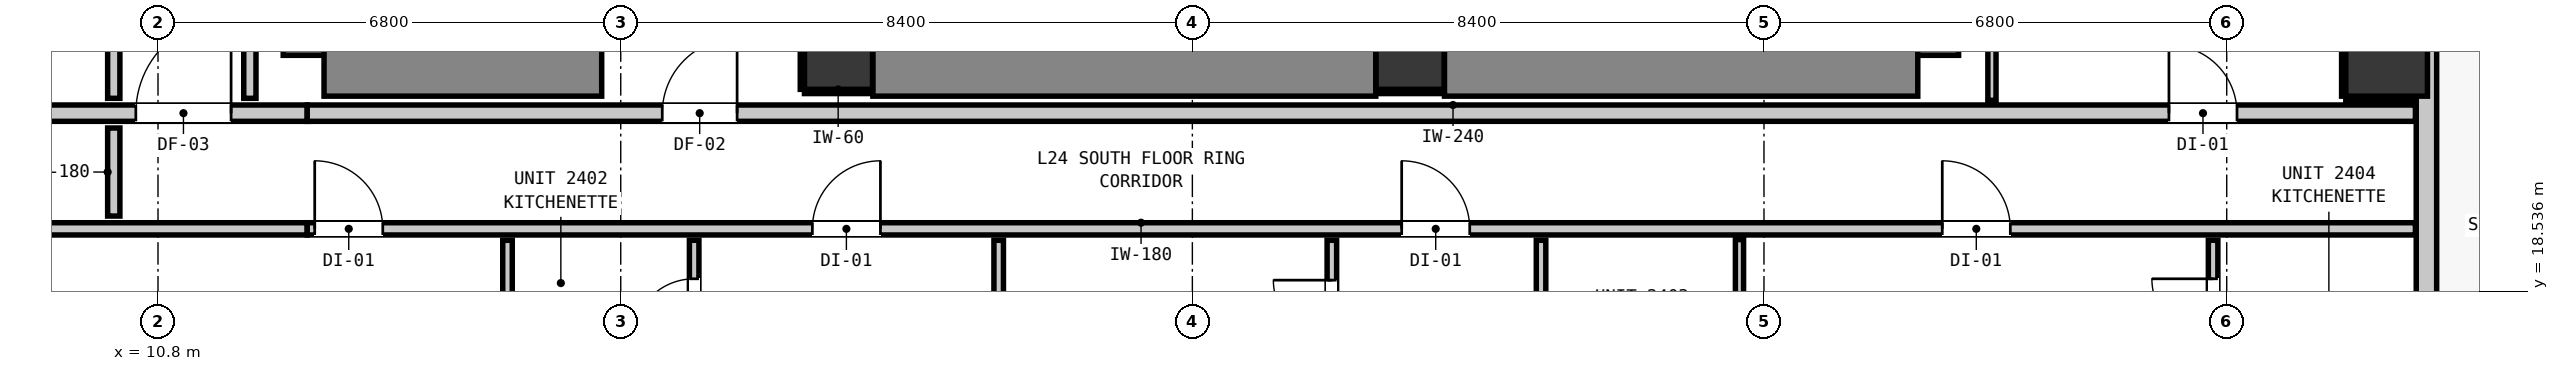
"""IFC4 building model, lengths in metres.
Left out: names, types, materials, properties, quantities, classifications, styles, units other than length and angle.
Written with IfcOpenShell. Run it as: python <this file> out.ifc"""

import sys

from ifc_helpers import new_model, si_unit, direction, frame, frame_2d, origin, origin_2d, place, context, subcontext, project, spatial, rectangle, extrude, element, fill, save


model = new_model("IFC4")
c1 = context("Model", 3, precision=1e-05, world=origin(), true_north=direction((0.0, 1.0)))
c2 = subcontext(c1, "Body", "Model", "MODEL_VIEW")
j1 = project(units=[si_unit("LENGTHUNIT", "METRE"), si_unit("PLANEANGLEUNIT", "RADIAN")], contexts=[c1])
p1 = place(None, origin())
s1 = spatial("IfcSite", under=j1, at=p1, CompositionType="ELEMENT")
p2 = place(p1, origin())
s2 = spatial("IfcBuilding", under=s1, at=p2, CompositionType="ELEMENT")
p3 = place(p2, frame((0.0, 0.0, 85.08)))
s3 = spatial("IfcBuildingStorey", under=s2, at=p3, CompositionType="ELEMENT", Elevation=85.08)
for number, where, z_axis, x_axis in (
    (1, (20.8, 22.0, 0.0), (0.0, 0.0, 1.0), (1.0, 0.0, 0.0)),
    (2, (29.2, 22.0, 0.0), (0.0, 0.0, 1.0), (1.0, 0.0, 0.0)),
):
    element("IfcColumn", number, at=place(p3, frame(where, z_axis=z_axis, x_axis=x_axis)), inside=s3, PredefinedType="COLUMN", context=c2, shape_type="SweptSolid", body=[
        extrude(rectangle(XDim=1.0, YDim=1.0, at=origin_2d()), origin(), (0.0, 0.0, 1.0), 3.32),
    ])
p4 = place(p3, frame((13.24, 22.0, 0.0), z_axis=(0.0, 0.0, 1.0), x_axis=(0.0, 1.0, 0.0)))
e3 = element("IfcWall", 3, at=p4, inside=s3, PredefinedType="SHEAR", context=c2, shape_type="SweptSolid", body=[
    extrude(rectangle(XDim=8.195, YDim=1.2, at=frame_2d((4.098, 0.0))), origin(), (0.0, 0.0, 1.0), 3.32),
])
p5 = place(p3, frame((13.24, 22.0, 0.0), z_axis=(0.0, 0.0, 1.0), x_axis=(1.0, 0.0, 0.0)))
e4 = element("IfcWall", 4, at=p5, inside=s3, PredefinedType="SHEAR", context=c2, shape_type="SweptSolid", body=[
    extrude(rectangle(XDim=4.08, YDim=1.2, at=frame_2d((2.04, 0.0))), origin(), (0.0, 0.0, 1.0), 3.32),
])
p6 = place(p3, frame((36.66, 22.0, 0.0), z_axis=(0.0, 0.0, 1.0), x_axis=(0.0, 1.0, 0.0)))
e5 = element("IfcWall", 5, at=p6, inside=s3, PredefinedType="SHEAR", context=c2, shape_type="SweptSolid", body=[
    extrude(rectangle(XDim=8.195, YDim=1.2, at=frame_2d((4.098, 0.0))), origin(), (0.0, 0.0, 1.0), 3.32),
])
p7 = place(p3, frame((29.705, 22.0, 0.0), z_axis=(0.0, 0.0, 1.0), x_axis=(1.0, 0.0, 0.0)))
e6 = element("IfcWall", 6, at=p7, inside=s3, PredefinedType="SHEAR", context=c2, shape_type="SweptSolid", body=[
    extrude(rectangle(XDim=6.955, YDim=1.2, at=frame_2d((3.478, 0.0))), origin(), (0.0, 0.0, 1.0), 3.32),
])
p8 = place(p3, frame((21.305, 22.0, 0.0), z_axis=(0.0, 0.0, 1.0), x_axis=(1.0, 0.0, 0.0)))
e7 = element("IfcWall", 7, at=p8, inside=s3, PredefinedType="SHEAR", context=c2, shape_type="SweptSolid", body=[
    extrude(rectangle(XDim=7.39, YDim=1.2, at=frame_2d((3.695, 0.0))), origin(), (0.0, 0.0, 1.0), 3.32),
])
p9 = place(p3, frame((43.55, 22.0, 0.0), z_axis=(0.0, 0.0, 1.0), x_axis=(1.0, 0.0, 0.0)))
e8 = element("IfcColumn", 8, at=p9, inside=s3, PredefinedType="COLUMN", context=c2, shape_type="SweptSolid", body=[
    extrude(rectangle(XDim=1.2, YDim=1.2, at=origin_2d()), origin(), (0.0, 0.0, 1.0), 3.32),
])
p10 = place(p3, frame((44.135, 51.035, 0.0), z_axis=(0.0, 0.0, 1.0), x_axis=(0.0, -1.0, 0.0)))
e9 = element("IfcWall", 9, at=p10, inside=s3, PredefinedType="STANDARD", context=c2, shape_type="SweptSolid", body=[
    extrude(rectangle(XDim=34.67, YDim=0.3, at=frame_2d((17.335, 0.0))), origin(), (0.0, 0.0, 1.0), 2.96),
])
p11 = place(p10, frame((0.901, 0.0, 0.0)))
e10 = element("IfcOpeningElement", 10, at=p11, cuts=e9, PredefinedType="OPENING", context=c2, shape_type="SweptSolid", body=[
    extrude(rectangle(XDim=1.0, YDim=2.15, at=frame_2d((0.5, 1.075))), frame((0.0, 0.16, 0.0), z_axis=(0.0, -1.0, 0.0), x_axis=(1.0, 0.0, 0.0)), (0.0, 0.0, 1.0), 0.32),
])
p12 = place(p10, frame((26.185, 0.0, 0.85)))
e11 = element("IfcOpeningElement", 11, at=p12, cuts=e9, PredefinedType="OPENING", context=c2, shape_type="SweptSolid", body=[
    extrude(rectangle(XDim=1.5, YDim=1.8, at=frame_2d((0.75, 0.9))), frame((0.0, 0.16, 0.0), z_axis=(0.0, -1.0, 0.0), x_axis=(1.0, 0.0, 0.0)), (0.0, 0.0, 1.0), 0.32),
])
p13 = place(p10, frame((13.401, 0.0, 0.85)))
e12 = element("IfcOpeningElement", 12, at=p13, cuts=e9, PredefinedType="OPENING", context=c2, shape_type="SweptSolid", body=[
    extrude(rectangle(XDim=1.5, YDim=1.8, at=frame_2d((0.75, 0.9))), frame((0.0, 0.16, 0.0), z_axis=(0.0, -1.0, 0.0), x_axis=(1.0, 0.0, 0.0)), (0.0, 0.0, 1.0), 0.32),
])
p14 = place(p3, frame((2.657, 21.15, 0.0), z_axis=(0.0, 0.0, 1.0), x_axis=(1.0, 0.0, 0.0)))
e13 = element("IfcWall", 13, at=p14, inside=s3, PredefinedType="PARTITIONING", context=c2, shape_type="SweptSolid", body=[
    extrude(rectangle(XDim=10.336, YDim=0.24, at=frame_2d((5.168, 0.0))), origin(), (0.0, 0.0, 1.0), 2.345),
])
p15 = place(p14, frame((7.817, 0.0, 0.0)))
e14 = element("IfcOpeningElement", 14, at=p15, cuts=e13, PredefinedType="OPENING", context=c2, shape_type="SweptSolid", body=[
    extrude(rectangle(XDim=1.4, YDim=2.15, at=frame_2d((0.7, 1.075))), frame((0.0, 0.13, 0.0), z_axis=(0.0, -1.0, 0.0), x_axis=(1.0, 0.0, 0.0)), (0.0, 0.0, 1.0), 0.26),
])
p16 = place(p3, frame((12.993, 21.15, 0.0), z_axis=(0.0, 0.0, 1.0), x_axis=(1.0, 0.0, 0.0)))
e15 = element("IfcWall", 15, at=p16, inside=s3, PredefinedType="PARTITIONING", context=c2, shape_type="SweptSolid", body=[
    extrude(rectangle(XDim=30.98, YDim=0.24, at=frame_2d((15.49, 0.0))), origin(), (0.0, 0.0, 1.0), 2.96),
])
p17 = place(p16, frame((5.217, 0.0, 0.0)))
e16 = element("IfcOpeningElement", 16, at=p17, cuts=e15, PredefinedType="OPENING", context=c2, shape_type="SweptSolid", body=[
    extrude(rectangle(XDim=1.1, YDim=2.15, at=frame_2d((0.55, 1.075))), frame((0.0, 0.13, 0.0), z_axis=(0.0, -1.0, 0.0), x_axis=(1.0, 0.0, 0.0)), (0.0, 0.0, 1.0), 0.26),
])
p18 = place(p16, frame((27.358, 0.0, 0.0)))
e17 = element("IfcOpeningElement", 17, at=p18, cuts=e15, PredefinedType="OPENING", context=c2, shape_type="SweptSolid", body=[
    extrude(rectangle(XDim=1.0, YDim=2.15, at=frame_2d((0.5, 1.075))), frame((0.0, 0.13, 0.0), z_axis=(0.0, -1.0, 0.0), x_axis=(1.0, 0.0, 0.0)), (0.0, 0.0, 1.0), 0.26),
])
p19 = place(p3, frame((2.657, 19.45, 0.0), z_axis=(0.0, 0.0, 1.0), x_axis=(1.0, 0.0, 0.0)))
e18 = element("IfcWall", 18, at=p19, inside=s3, PredefinedType="PARTITIONING", context=c2, shape_type="SweptSolid", body=[
    extrude(rectangle(XDim=10.336, YDim=0.18, at=frame_2d((5.168, 0.0))), origin(), (0.0, 0.0, 1.0), 2.345),
])
p20 = place(p3, frame((12.993, 19.45, 0.0), z_axis=(0.0, 0.0, 1.0), x_axis=(1.0, 0.0, 0.0)))
e19 = element("IfcWall", 19, at=p20, inside=s3, PredefinedType="PARTITIONING", context=c2, shape_type="SweptSolid", body=[
    extrude(rectangle(XDim=30.98, YDim=0.18, at=frame_2d((15.49, 0.0))), origin(), (0.0, 0.0, 1.0), 2.96),
])
p21 = place(p20, frame((0.11, 0.0, 0.0)))
e20 = element("IfcOpeningElement", 20, at=p21, cuts=e19, PredefinedType="OPENING", context=c2, shape_type="SweptSolid", body=[
    extrude(rectangle(XDim=1.0, YDim=2.15, at=frame_2d((0.5, 1.075))), frame((0.0, 0.1, 0.0), z_axis=(0.0, -1.0, 0.0), x_axis=(1.0, 0.0, 0.0)), (0.0, 0.0, 1.0), 0.2),
])
p22 = place(p20, frame((7.423, 0.0, 0.0)))
e21 = element("IfcOpeningElement", 21, at=p22, cuts=e19, PredefinedType="OPENING", context=c2, shape_type="SweptSolid", body=[
    extrude(rectangle(XDim=1.0, YDim=2.15, at=frame_2d((0.5, 1.075))), frame((0.0, 0.1, 0.0), z_axis=(0.0, -1.0, 0.0), x_axis=(1.0, 0.0, 0.0)), (0.0, 0.0, 1.0), 0.2),
])
p23 = place(p20, frame((16.083, 0.0, 0.0)))
e22 = element("IfcOpeningElement", 22, at=p23, cuts=e19, PredefinedType="OPENING", context=c2, shape_type="SweptSolid", body=[
    extrude(rectangle(XDim=1.0, YDim=2.15, at=frame_2d((0.5, 1.075))), frame((0.0, 0.1, 0.0), z_axis=(0.0, -1.0, 0.0), x_axis=(1.0, 0.0, 0.0)), (0.0, 0.0, 1.0), 0.2),
])
p24 = place(p20, frame((24.027, 0.0, 0.0)))
e23 = element("IfcOpeningElement", 23, at=p24, cuts=e19, PredefinedType="OPENING", context=c2, shape_type="SweptSolid", body=[
    extrude(rectangle(XDim=1.0, YDim=2.15, at=frame_2d((0.5, 1.075))), frame((0.0, 0.1, 0.0), z_axis=(0.0, -1.0, 0.0), x_axis=(1.0, 0.0, 0.0)), (0.0, 0.0, 1.0), 0.2),
])
p25 = place(p3, frame((10.15, 19.638, 0.0), z_axis=(0.0, 0.0, 1.0), x_axis=(0.0, 1.0, 0.0)))
e24 = element("IfcWall", 24, at=p25, inside=s3, PredefinedType="PARTITIONING", context=c2, shape_type="SweptSolid", body=[
    extrude(rectangle(XDim=1.294, YDim=0.18, at=frame_2d((0.647, 0.0))), origin(), (0.0, 0.0, 1.0), 2.96),
])
p26 = place(p3, frame((10.15, 21.368, 0.0), z_axis=(0.0, 0.0, 1.0), x_axis=(0.0, 1.0, 0.0)))
e25 = element("IfcWall", 25, at=p26, inside=s3, PredefinedType="PARTITIONING", context=c2, shape_type="SweptSolid", body=[
    extrude(rectangle(XDim=2.074, YDim=0.18, at=frame_2d((1.037, 0.0))), origin(), (0.0, 0.0, 1.0), 2.96),
])
p27 = place(p3, frame((12.15, 21.368, 0.0), z_axis=(0.0, 0.0, 1.0), x_axis=(0.0, 1.0, 0.0)))
e26 = element("IfcWall", 26, at=p27, inside=s3, PredefinedType="PARTITIONING", context=c2, shape_type="SweptSolid", body=[
    extrude(rectangle(XDim=18.694, YDim=0.18, at=frame_2d((9.347, 0.0))), origin(), (0.0, 0.0, 1.0), 2.96),
])
p28 = place(p3, frame((15.936, 17.255, 0.0), z_axis=(0.0, 0.0, 1.0), x_axis=(0.0, 1.0, 0.0)))
e27 = element("IfcWall", 27, at=p28, inside=s3, PredefinedType="PARTITIONING", context=c2, shape_type="SweptSolid", body=[
    extrude(rectangle(XDim=2.027, YDim=0.14, at=frame_2d((1.014, 0.0))), origin(), (0.0, 0.0, 1.0), 2.96),
])
p29 = place(p3, frame((18.679, 17.255, 0.0), z_axis=(0.0, 0.0, 1.0), x_axis=(0.0, 1.0, 0.0)))
e28 = element("IfcWall", 28, at=p29, inside=s3, PredefinedType="PARTITIONING", context=c2, shape_type="SweptSolid", body=[
    extrude(rectangle(XDim=2.027, YDim=0.14, at=frame_2d((1.014, 0.0))), origin(), (0.0, 0.0, 1.0), 2.96),
])
p30 = place(p29, frame((0.561, 0.0, 0.0)))
e29 = element("IfcOpeningElement", 29, at=p30, cuts=e28, PredefinedType="OPENING", context=c2, shape_type="SweptSolid", body=[
    extrude(rectangle(XDim=0.9, YDim=2.1, at=frame_2d((0.45, 1.05))), frame((0.0, 0.08, 0.0), z_axis=(0.0, -1.0, 0.0), x_axis=(1.0, 0.0, 0.0)), (0.0, 0.0, 1.0), 0.16),
])
p31 = place(p3, frame((23.154, 17.255, 0.0), z_axis=(0.0, 0.0, 1.0), x_axis=(0.0, 1.0, 0.0)))
e30 = element("IfcWall", 30, at=p31, inside=s3, PredefinedType="PARTITIONING", context=c2, shape_type="SweptSolid", body=[
    extrude(rectangle(XDim=2.027, YDim=0.14, at=frame_2d((1.014, 0.0))), origin(), (0.0, 0.0, 1.0), 2.96),
])
p32 = place(p3, frame((28.05, 17.255, 0.0), z_axis=(0.0, 0.0, 1.0), x_axis=(0.0, 1.0, 0.0)))
e31 = element("IfcWall", 31, at=p32, inside=s3, PredefinedType="PARTITIONING", context=c2, shape_type="SweptSolid", body=[
    extrude(rectangle(XDim=2.027, YDim=0.14, at=frame_2d((1.014, 0.0))), origin(), (0.0, 0.0, 1.0), 2.96),
])
p33 = place(p32, frame((0.581, 0.0, 0.0)))
e32 = element("IfcOpeningElement", 32, at=p33, cuts=e31, PredefinedType="OPENING", context=c2, shape_type="SweptSolid", body=[
    extrude(rectangle(XDim=0.86, YDim=2.02, at=frame_2d((0.43, 1.01))), frame((0.0, 0.08, 0.0), z_axis=(0.0, -1.0, 0.0), x_axis=(1.0, 0.0, 0.0)), (0.0, 0.0, 1.0), 0.16),
])
p34 = place(p3, frame((31.124, 14.027, 0.0), z_axis=(0.0, 0.0, 1.0), x_axis=(0.0, 1.0, 0.0)))
e33 = element("IfcWall", 33, at=p34, inside=s3, PredefinedType="PARTITIONING", context=c2, shape_type="SweptSolid", body=[
    extrude(rectangle(XDim=5.255, YDim=0.14, at=frame_2d((2.627, 0.0))), origin(), (0.0, 0.0, 1.0), 2.96),
])
p35 = place(p34, frame((2.248, 0.0, 0.0)))
e34 = element("IfcOpeningElement", 34, at=p35, cuts=e33, PredefinedType="OPENING", context=c2, shape_type="SweptSolid", body=[
    extrude(rectangle(XDim=0.9, YDim=2.1, at=frame_2d((0.45, 1.05))), frame((0.0, 0.08, 0.0), z_axis=(0.0, -1.0, 0.0), x_axis=(1.0, 0.0, 0.0)), (0.0, 0.0, 1.0), 0.16),
])
p36 = place(p3, frame((41.0, 17.255, 0.0), z_axis=(0.0, 0.0, 1.0), x_axis=(0.0, 1.0, 0.0)))
e35 = element("IfcWall", 35, at=p36, inside=s3, PredefinedType="PARTITIONING", context=c2, shape_type="SweptSolid", body=[
    extrude(rectangle(XDim=2.027, YDim=0.14, at=frame_2d((1.014, 0.0))), origin(), (0.0, 0.0, 1.0), 2.96),
])
p37 = place(p36, frame((0.561, 0.0, 0.0)))
e36 = element("IfcOpeningElement", 36, at=p37, cuts=e35, PredefinedType="OPENING", context=c2, shape_type="SweptSolid", body=[
    extrude(rectangle(XDim=0.9, YDim=2.1, at=frame_2d((0.45, 1.05))), frame((0.0, 0.08, 0.0), z_axis=(0.0, -1.0, 0.0), x_axis=(1.0, 0.0, 0.0)), (0.0, 0.0, 1.0), 0.16),
])
p38 = place(p3, frame((34.04, 14.027, 0.0), z_axis=(0.0, 0.0, 1.0), x_axis=(0.0, 1.0, 0.0)))
e37 = element("IfcWall", 37, at=p38, inside=s3, PredefinedType="PARTITIONING", context=c2, shape_type="SweptSolid", body=[
    extrude(rectangle(XDim=5.265, YDim=0.12, at=frame_2d((2.632, 0.0))), origin(), (0.0, 0.0, 1.0), 2.96),
])
p39 = place(p3, frame((37.75, 21.338, 0.0), z_axis=(0.0, 0.0, 1.0), x_axis=(0.0, 1.0, 0.0)))
e38 = element("IfcWall", 38, at=p39, inside=s3, PredefinedType="PARTITIONING", context=c2, shape_type="SweptSolid", body=[
    extrude(rectangle(XDim=4.024, YDim=0.12, at=frame_2d((2.012, 0.0))), origin(), (0.0, 0.0, 1.0), 2.96),
])
p40 = place(p3, frame((20.3, 21.468, 0.0), z_axis=(0.0, 0.0, 1.0), x_axis=(1.0, 0.0, 0.0)))
e39 = element("IfcWall", 39, at=p40, inside=s3, PredefinedType="PARTITIONING", context=c2, shape_type="SweptSolid", body=[
    extrude(rectangle(XDim=0.99, YDim=0.06, at=frame_2d((0.495, 0.0))), origin(), (0.0, 0.0, 1.0), 1.45),
])
p41 = place(p3, frame((20.268, 21.5, 0.0), z_axis=(0.0, 0.0, 1.0), x_axis=(0.0, 1.0, 0.0)))
e40 = element("IfcWall", 40, at=p41, inside=s3, PredefinedType="PARTITIONING", context=c2, shape_type="SweptSolid", body=[
    extrude(rectangle(XDim=1.0, YDim=0.06, at=frame_2d((0.5, 0.0))), origin(), (0.0, 0.0, 1.0), 1.45),
])
p42 = place(p3, frame((28.71, 21.468, 0.0), z_axis=(0.0, 0.0, 1.0), x_axis=(1.0, 0.0, 0.0)))
e41 = element("IfcWall", 41, at=p42, inside=s3, PredefinedType="PARTITIONING", context=c2, shape_type="SweptSolid", body=[
    extrude(rectangle(XDim=0.98, YDim=0.06, at=frame_2d((0.49, 0.0))), origin(), (0.0, 0.0, 1.0), 1.45),
])
p43 = place(p3, frame((42.95, 21.368, 0.0), z_axis=(0.0, 0.0, 1.0), x_axis=(1.0, 0.0, 0.0)))
e42 = element("IfcWall", 42, at=p43, inside=s3, PredefinedType="PARTITIONING", context=c2, shape_type="SweptSolid", body=[
    extrude(rectangle(XDim=1.02, YDim=0.06, at=frame_2d((0.51, 0.0))), origin(), (0.0, 0.0, 1.0), 1.45),
])
p44 = place(p3, frame((42.918, 21.4, 0.0), z_axis=(0.0, 0.0, 1.0), x_axis=(0.0, 1.0, 0.0)))
e43 = element("IfcWall", 43, at=p44, inside=s3, PredefinedType="PARTITIONING", context=c2, shape_type="SweptSolid", body=[
    extrude(rectangle(XDim=1.2, YDim=0.06, at=frame_2d((0.6, 0.0))), origin(), (0.0, 0.0, 1.0), 1.45),
])
p45 = place(p17, origin())
e44 = element("IfcDoor", 44, at=p45, inside=s3, OperationType="SINGLE_SWING_RIGHT", PredefinedType="DOOR", context=c2, shape_type="SweptSolid", body=[
    extrude(rectangle(XDim=1.1, YDim=2.15, at=frame_2d((0.55, 1.075))), frame((0.0, 0.025, 0.0), z_axis=(0.0, -1.0, 0.0), x_axis=(1.0, 0.0, 0.0)), (0.0, 0.0, 1.0), 0.05),
])
fill(e16, e44)
p46 = place(p15, origin())
e45 = element("IfcDoor", 45, at=p46, inside=s3, OperationType="SINGLE_SWING_RIGHT", PredefinedType="DOOR", context=c2, shape_type="SweptSolid", body=[
    extrude(rectangle(XDim=1.4, YDim=2.15, at=frame_2d((0.7, 1.075))), frame((0.0, 0.025, 0.0), z_axis=(0.0, -1.0, 0.0), x_axis=(1.0, 0.0, 0.0)), (0.0, 0.0, 1.0), 0.05),
])
fill(e14, e45)
p47 = place(p21, origin())
e46 = element("IfcDoor", 46, at=p47, inside=s3, OperationType="SINGLE_SWING_LEFT", PredefinedType="DOOR", context=c2, shape_type="SweptSolid", body=[
    extrude(rectangle(XDim=1.0, YDim=2.15, at=frame_2d((0.5, 1.075))), frame((0.0, 0.025, 0.0), z_axis=(0.0, -1.0, 0.0), x_axis=(1.0, 0.0, 0.0)), (0.0, 0.0, 1.0), 0.05),
])
fill(e20, e46)
p48 = place(p22, origin())
e47 = element("IfcDoor", 47, at=p48, inside=s3, OperationType="SINGLE_SWING_RIGHT", PredefinedType="DOOR", context=c2, shape_type="SweptSolid", body=[
    extrude(rectangle(XDim=1.0, YDim=2.15, at=frame_2d((0.5, 1.075))), frame((0.0, 0.025, 0.0), z_axis=(0.0, -1.0, 0.0), x_axis=(1.0, 0.0, 0.0)), (0.0, 0.0, 1.0), 0.05),
])
fill(e21, e47)
p49 = place(p30, origin())
e48 = element("IfcDoor", 48, at=p49, inside=s3, OperationType="SINGLE_SWING_LEFT", PredefinedType="DOOR", context=c2, shape_type="SweptSolid", body=[
    extrude(rectangle(XDim=0.9, YDim=2.1, at=frame_2d((0.45, 1.05))), frame((0.0, 0.025, 0.0), z_axis=(0.0, -1.0, 0.0), x_axis=(1.0, 0.0, 0.0)), (0.0, 0.0, 1.0), 0.05),
])
fill(e29, e48)
p50 = place(p23, origin())
e49 = element("IfcDoor", 49, at=p50, inside=s3, OperationType="SINGLE_SWING_LEFT", PredefinedType="DOOR", context=c2, shape_type="SweptSolid", body=[
    extrude(rectangle(XDim=1.0, YDim=2.15, at=frame_2d((0.5, 1.075))), frame((0.0, 0.025, 0.0), z_axis=(0.0, -1.0, 0.0), x_axis=(1.0, 0.0, 0.0)), (0.0, 0.0, 1.0), 0.05),
])
fill(e22, e49)
p51 = place(p33, origin())
e50 = element("IfcDoor", 50, at=p51, inside=s3, OperationType="SINGLE_SWING_RIGHT", PredefinedType="DOOR", context=c2, shape_type="SweptSolid", body=[
    extrude(rectangle(XDim=0.86, YDim=2.02, at=frame_2d((0.43, 1.01))), frame((0.0, 0.025, 0.0), z_axis=(0.0, -1.0, 0.0), x_axis=(1.0, 0.0, 0.0)), (0.0, 0.0, 1.0), 0.05),
])
fill(e32, e50)
p52 = place(p24, origin())
e51 = element("IfcDoor", 51, at=p52, inside=s3, OperationType="SINGLE_SWING_LEFT", PredefinedType="DOOR", context=c2, shape_type="SweptSolid", body=[
    extrude(rectangle(XDim=1.0, YDim=2.15, at=frame_2d((0.5, 1.075))), frame((0.0, 0.025, 0.0), z_axis=(0.0, -1.0, 0.0), x_axis=(1.0, 0.0, 0.0)), (0.0, 0.0, 1.0), 0.05),
])
fill(e23, e51)
p53 = place(p37, origin())
e52 = element("IfcDoor", 52, at=p53, inside=s3, OperationType="SINGLE_SWING_RIGHT", PredefinedType="DOOR", context=c2, shape_type="SweptSolid", body=[
    extrude(rectangle(XDim=0.9, YDim=2.1, at=frame_2d((0.45, 1.05))), frame((0.0, 0.025, 0.0), z_axis=(0.0, -1.0, 0.0), x_axis=(1.0, 0.0, 0.0)), (0.0, 0.0, 1.0), 0.05),
])
fill(e36, e52)
p54 = place(p18, origin())
e53 = element("IfcDoor", 53, at=p54, inside=s3, OperationType="SINGLE_SWING_LEFT", PredefinedType="DOOR", context=c2, shape_type="SweptSolid", body=[
    extrude(rectangle(XDim=1.0, YDim=2.15, at=frame_2d((0.5, 1.075))), frame((0.0, 0.025, 0.0), z_axis=(0.0, -1.0, 0.0), x_axis=(1.0, 0.0, 0.0)), (0.0, 0.0, 1.0), 0.05),
])
fill(e17, e53)
save(model, sys.argv[1])
